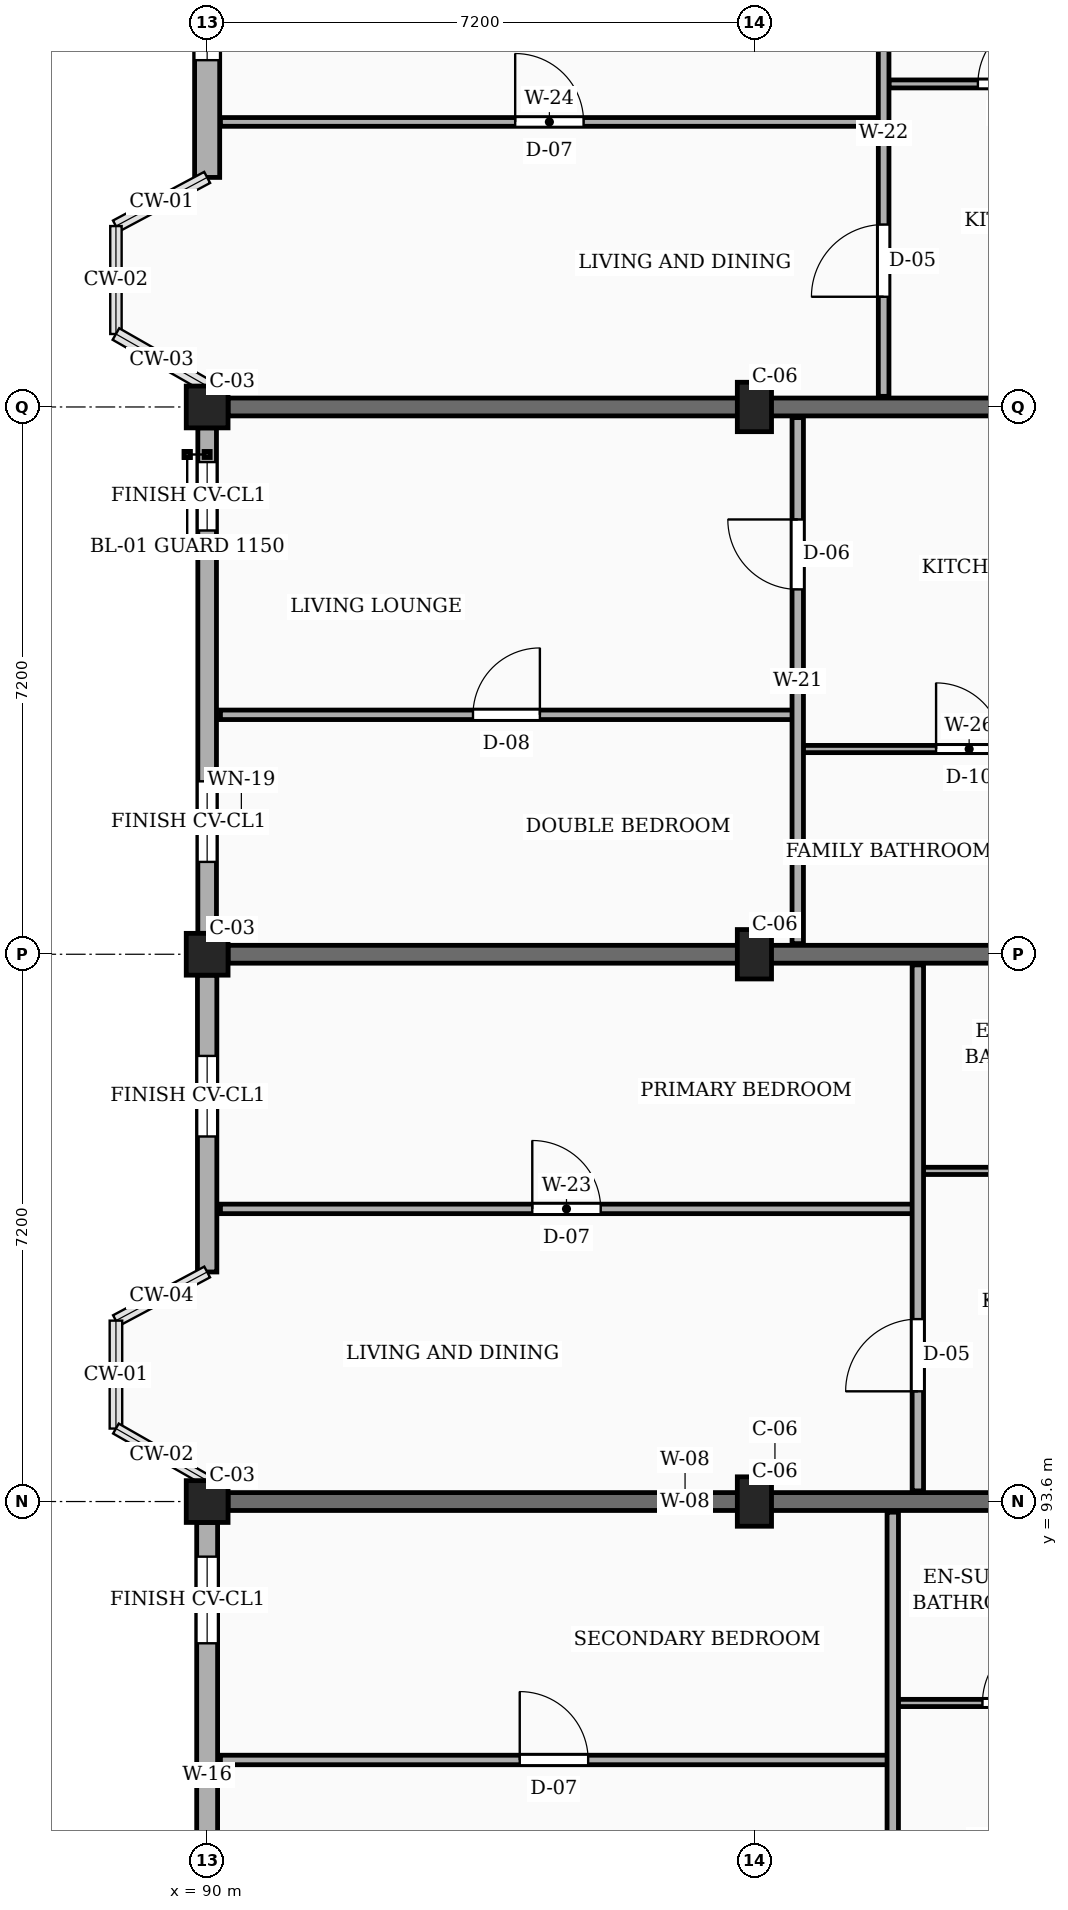
"""IFC4 building model, lengths in metres.
Left out: names, types, materials, properties, quantities, classifications, styles, units other than length and angle.
Written with IfcOpenShell. Run it as: python <this file> out.ifc"""

import sys

from ifc_helpers import new_model, si_unit, direction, frame, frame_2d, origin, origin_2d, place, context, subcontext, project, spatial, rectangle, extrude, element, fill, save


model = new_model("IFC4")
c1 = context("Model", 3, precision=1e-05, world=origin(), true_north=direction((0.0, 1.0)))
c2 = subcontext(c1, "Body", "Model", "MODEL_VIEW")
j1 = project(units=[si_unit("LENGTHUNIT", "METRE"), si_unit("PLANEANGLEUNIT", "RADIAN")], contexts=[c1])
p1 = place(None, origin())
s1 = spatial("IfcSite", under=j1, at=p1, CompositionType="ELEMENT")
p2 = place(p1, origin())
s2 = spatial("IfcBuilding", under=s1, at=p2, CompositionType="ELEMENT")
p3 = place(p2, frame((0.0, 0.0, 13.95)))
s3 = spatial("IfcBuildingStorey", under=s2, at=p3, CompositionType="ELEMENT", Elevation=13.95)
for number, where, z_axis, x_axis in (
    (1, (90.0, 93.6, 0.0), (0.0, 0.0, 1.0), (1.0, 0.0, 0.0)),
    (2, (90.0, 100.8, 0.0), (0.0, 0.0, 1.0), (1.0, 0.0, 0.0)),
    (3, (90.0, 108.0, 0.0), (0.0, 0.0, 1.0), (1.0, 0.0, 0.0)),
):
    element("IfcColumn", number, at=place(p3, frame(where, z_axis=z_axis, x_axis=x_axis)), inside=s3, PredefinedType="COLUMN", context=c2, shape_type="SweptSolid", body=[
        extrude(rectangle(XDim=0.55, YDim=0.55, at=origin_2d()), origin(), (0.0, 0.0, 1.0), 3.15),
    ])
for number, where, z_axis, x_axis in (
    (4, (97.2, 93.6, 0.0), (0.0, 0.0, 1.0), (1.0, 0.0, 0.0)),
    (5, (97.2, 100.8, 0.0), (0.0, 0.0, 1.0), (1.0, 0.0, 0.0)),
    (6, (97.2, 108.0, 0.0), (0.0, 0.0, 1.0), (1.0, 0.0, 0.0)),
):
    element("IfcColumn", number, at=place(p3, frame(where, z_axis=z_axis, x_axis=x_axis)), inside=s3, PredefinedType="COLUMN", context=c2, shape_type="SweptSolid", body=[
        extrude(rectangle(XDim=0.45, YDim=0.65, at=origin_2d()), origin(), (0.0, 0.0, 1.0), 3.15),
    ])
for number, where, z_axis, x_axis in (
    (7, (90.275, 93.6, 0.0), (0.0, 0.0, 1.0), (1.0, 0.0, 0.0)),
    (8, (90.275, 100.8, 0.0), (0.0, 0.0, 1.0), (1.0, 0.0, 0.0)),
    (9, (90.275, 108.0, 0.0), (0.0, 0.0, 1.0), (1.0, 0.0, 0.0)),
):
    element("IfcWall", number, at=place(p3, frame(where, z_axis=z_axis, x_axis=x_axis)), inside=s3, PredefinedType="SOLIDWALL", context=c2, shape_type="SweptSolid", body=[
        extrude(rectangle(XDim=12.025, YDim=0.235, at=frame_2d((6.013, 0.0))), origin(), (0.0, 0.0, 1.0), 2.19),
    ])
p4 = place(p3, frame((90.0, 114.925, 0.0), z_axis=(0.0, 0.0, 1.0), x_axis=(0.0, -1.0, 0.0)))
e10 = element("IfcWall", 10, at=p4, inside=s3, PredefinedType="SOLIDWALL", context=c2, shape_type="SweptSolid", body=[
    extrude(rectangle(XDim=3.905, YDim=0.33, at=frame_2d((1.953, 0.0))), origin(), (0.0, 0.0, 1.0), 2.46),
])
p5 = place(p4, frame((0.923, 0.0, 0.78)))
e11 = element("IfcOpeningElement", 11, at=p5, cuts=e10, PredefinedType="OPENING", context=c2, shape_type="SweptSolid", body=[
    extrude(rectangle(XDim=1.44, YDim=1.26, at=frame_2d((0.72, 0.63))), frame((0.0, 0.175, 0.0), z_axis=(0.0, -1.0, 0.0), x_axis=(1.0, 0.0, 0.0)), (0.0, 0.0, 1.0), 0.35),
])
p6 = place(p3, frame((90.0, 107.725, 0.0), z_axis=(0.0, 0.0, 1.0), x_axis=(0.0, -1.0, 0.0)))
e12 = element("IfcWall", 12, at=p6, inside=s3, PredefinedType="SOLIDWALL", context=c2, shape_type="SweptSolid", body=[
    extrude(rectangle(XDim=6.65, YDim=0.245, at=frame_2d((3.325, 0.0))), origin(), (0.0, 0.0, 1.0), 2.46),
])
p7 = place(p6, frame((0.45, 0.0, 0.78)))
e13 = element("IfcOpeningElement", 13, at=p7, cuts=e12, PredefinedType="OPENING", context=c2, shape_type="SweptSolid", body=[
    extrude(rectangle(XDim=0.9, YDim=1.36, at=frame_2d((0.45, 0.68))), frame((0.0, 0.133, 0.0), z_axis=(0.0, -1.0, 0.0), x_axis=(1.0, 0.0, 0.0)), (0.0, 0.0, 1.0), 0.265),
])
p8 = place(p6, frame((4.65, 0.0, 0.78)))
e14 = element("IfcOpeningElement", 14, at=p8, cuts=e12, PredefinedType="OPENING", context=c2, shape_type="SweptSolid", body=[
    extrude(rectangle(XDim=1.06, YDim=1.36, at=frame_2d((0.53, 0.68))), frame((0.0, 0.133, 0.0), z_axis=(0.0, -1.0, 0.0), x_axis=(1.0, 0.0, 0.0)), (0.0, 0.0, 1.0), 0.265),
])
p9 = place(p3, frame((90.0, 100.525, 0.0), z_axis=(0.0, 0.0, 1.0), x_axis=(0.0, -1.0, 0.0)))
e15 = element("IfcWall", 15, at=p9, inside=s3, PredefinedType="SOLIDWALL", context=c2, shape_type="SweptSolid", body=[
    extrude(rectangle(XDim=3.905, YDim=0.255, at=frame_2d((1.952, 0.0))), origin(), (0.0, 0.0, 1.0), 2.46),
])
p10 = place(p9, frame((1.062, 0.0, 0.78)))
e16 = element("IfcOpeningElement", 16, at=p10, cuts=e15, PredefinedType="OPENING", context=c2, shape_type="SweptSolid", body=[
    extrude(rectangle(XDim=1.06, YDim=1.36, at=frame_2d((0.53, 0.68))), frame((0.0, 0.137, 0.0), z_axis=(0.0, -1.0, 0.0), x_axis=(1.0, 0.0, 0.0)), (0.0, 0.0, 1.0), 0.275),
])
p11 = place(p3, frame((90.0, 93.325, 0.0), z_axis=(0.0, 0.0, 1.0), x_axis=(0.0, -1.0, 0.0)))
e17 = element("IfcWall", 17, at=p11, inside=s3, PredefinedType="SOLIDWALL", context=c2, shape_type="SweptSolid", body=[
    extrude(rectangle(XDim=6.65, YDim=0.275, at=frame_2d((3.325, 0.0))), origin(), (0.0, 0.0, 1.0), 2.46),
])
p12 = place(p11, frame((0.45, 0.0, 0.78)))
e18 = element("IfcOpeningElement", 18, at=p12, cuts=e17, PredefinedType="OPENING", context=c2, shape_type="SweptSolid", body=[
    extrude(rectangle(XDim=1.14, YDim=1.36, at=frame_2d((0.57, 0.68))), frame((0.0, 0.147, 0.0), z_axis=(0.0, -1.0, 0.0), x_axis=(1.0, 0.0, 0.0)), (0.0, 0.0, 1.0), 0.295),
])
p13 = place(p11, frame((4.65, 0.0, 0.78)))
e19 = element("IfcOpeningElement", 19, at=p13, cuts=e17, PredefinedType="OPENING", context=c2, shape_type="SweptSolid", body=[
    extrude(rectangle(XDim=1.3, YDim=1.36, at=frame_2d((0.65, 0.68))), frame((0.0, 0.147, 0.0), z_axis=(0.0, -1.0, 0.0), x_axis=(1.0, 0.0, 0.0)), (0.0, 0.0, 1.0), 0.295),
])
p14 = place(p3, frame((90.175, 90.2, 0.0), z_axis=(0.0, 0.0, 1.0), x_axis=(1.0, 0.0, 0.0)))
e20 = element("IfcWall", 20, at=p14, inside=s3, PredefinedType="PARTITIONING", context=c2, shape_type="SweptSolid", body=[
    extrude(rectangle(XDim=8.775, YDim=0.125, at=frame_2d((4.387, 0.0))), origin(), (0.0, 0.0, 1.0), 2.325),
])
p15 = place(p14, frame((3.938, 0.0, 0.0)))
e21 = element("IfcOpeningElement", 21, at=p15, cuts=e20, PredefinedType="OPENING", context=c2, shape_type="SweptSolid", body=[
    extrude(rectangle(XDim=0.9, YDim=2.1, at=frame_2d((0.45, 1.05))), frame((0.0, 0.073, 0.0), z_axis=(0.0, -1.0, 0.0), x_axis=(1.0, 0.0, 0.0)), (0.0, 0.0, 1.0), 0.145),
])
p16 = place(p3, frame((99.09, 90.95, 0.0), z_axis=(0.0, 0.0, 1.0), x_axis=(1.0, 0.0, 0.0)))
e22 = element("IfcWall", 22, at=p16, inside=s3, PredefinedType="PARTITIONING", context=c2, shape_type="SweptSolid", body=[
    extrude(rectangle(XDim=3.12, YDim=0.095, at=frame_2d((1.56, 0.0))), origin(), (0.0, 0.0, 1.0), 2.325),
])
p17 = place(p16, frame((1.11, 0.0, 0.0)))
e23 = element("IfcOpeningElement", 23, at=p17, cuts=e22, PredefinedType="OPENING", context=c2, shape_type="SweptSolid", body=[
    extrude(rectangle(XDim=0.9, YDim=2.05, at=frame_2d((0.45, 1.025))), frame((0.0, 0.058, 0.0), z_axis=(0.0, -1.0, 0.0), x_axis=(1.0, 0.0, 0.0)), (0.0, 0.0, 1.0), 0.115),
])
p18 = place(p3, frame((99.02, 86.575, 0.0), z_axis=(0.0, 0.0, 1.0), x_axis=(0.0, 1.0, 0.0)))
e24 = element("IfcWall", 24, at=p18, inside=s3, PredefinedType="PARTITIONING", context=c2, shape_type="SweptSolid", body=[
    extrude(rectangle(XDim=6.885, YDim=0.15, at=frame_2d((3.442, 0.0))), origin(), (0.0, 0.0, 1.0), 2.325),
])
p19 = place(p18, frame((1.275, 0.0, 0.0)))
e25 = element("IfcOpeningElement", 25, at=p19, cuts=e24, PredefinedType="OPENING", context=c2, shape_type="SweptSolid", body=[
    extrude(rectangle(XDim=0.95, YDim=2.1, at=frame_2d((0.475, 1.05))), frame((0.0, 0.085, 0.0), z_axis=(0.0, -1.0, 0.0), x_axis=(1.0, 0.0, 0.0)), (0.0, 0.0, 1.0), 0.17),
])
p20 = place(p3, frame((90.175, 97.45, 0.0), z_axis=(0.0, 0.0, 1.0), x_axis=(1.0, 0.0, 0.0)))
e26 = element("IfcWall", 26, at=p20, inside=s3, PredefinedType="PARTITIONING", context=c2, shape_type="SweptSolid", body=[
    extrude(rectangle(XDim=9.105, YDim=0.125, at=frame_2d((4.552, 0.0))), origin(), (0.0, 0.0, 1.0), 2.325),
])
p21 = place(p20, frame((4.103, 0.0, 0.0)))
e27 = element("IfcOpeningElement", 27, at=p21, cuts=e26, PredefinedType="OPENING", context=c2, shape_type="SweptSolid", body=[
    extrude(rectangle(XDim=0.9, YDim=2.1, at=frame_2d((0.45, 1.05))), frame((0.0, 0.073, 0.0), z_axis=(0.0, -1.0, 0.0), x_axis=(1.0, 0.0, 0.0)), (0.0, 0.0, 1.0), 0.145),
])
p22 = place(p3, frame((99.42, 97.95, 0.0), z_axis=(0.0, 0.0, 1.0), x_axis=(1.0, 0.0, 0.0)))
e28 = element("IfcWall", 28, at=p22, inside=s3, PredefinedType="PARTITIONING", context=c2, shape_type="SweptSolid", body=[
    extrude(rectangle(XDim=2.79, YDim=0.095, at=frame_2d((1.395, 0.0))), origin(), (0.0, 0.0, 1.0), 2.325),
])
p23 = place(p22, frame((0.945, 0.0, 0.0)))
e29 = element("IfcOpeningElement", 29, at=p23, cuts=e28, PredefinedType="OPENING", context=c2, shape_type="SweptSolid", body=[
    extrude(rectangle(XDim=0.9, YDim=2.05, at=frame_2d((0.45, 1.025))), frame((0.0, 0.058, 0.0), z_axis=(0.0, -1.0, 0.0), x_axis=(1.0, 0.0, 0.0)), (0.0, 0.0, 1.0), 0.115),
])
p24 = place(p3, frame((99.35, 93.74, 0.0), z_axis=(0.0, 0.0, 1.0), x_axis=(0.0, 1.0, 0.0)))
e30 = element("IfcWall", 30, at=p24, inside=s3, PredefinedType="PARTITIONING", context=c2, shape_type="SweptSolid", body=[
    extrude(rectangle(XDim=6.92, YDim=0.15, at=frame_2d((3.46, 0.0))), origin(), (0.0, 0.0, 1.0), 2.325),
])
p25 = place(p24, frame((1.31, 0.0, 0.0)))
e31 = element("IfcOpeningElement", 31, at=p25, cuts=e30, PredefinedType="OPENING", context=c2, shape_type="SweptSolid", body=[
    extrude(rectangle(XDim=0.95, YDim=2.1, at=frame_2d((0.475, 1.05))), frame((0.0, 0.085, 0.0), z_axis=(0.0, -1.0, 0.0), x_axis=(1.0, 0.0, 0.0)), (0.0, 0.0, 1.0), 0.17),
])
p26 = place(p3, frame((90.175, 103.95, 0.0), z_axis=(0.0, 0.0, 1.0), x_axis=(1.0, 0.0, 0.0)))
e32 = element("IfcWall", 32, at=p26, inside=s3, PredefinedType="PARTITIONING", context=c2, shape_type="SweptSolid", body=[
    extrude(rectangle(XDim=7.525, YDim=0.125, at=frame_2d((3.762, 0.0))), origin(), (0.0, 0.0, 1.0), 2.325),
])
p27 = place(p26, frame((3.323, 0.0, 0.0)))
e33 = element("IfcOpeningElement", 33, at=p27, cuts=e32, PredefinedType="OPENING", context=c2, shape_type="SweptSolid", body=[
    extrude(rectangle(XDim=0.88, YDim=2.08, at=frame_2d((0.44, 1.04))), frame((0.0, 0.073, 0.0), z_axis=(0.0, -1.0, 0.0), x_axis=(1.0, 0.0, 0.0)), (0.0, 0.0, 1.0), 0.145),
])
p28 = place(p3, frame((97.84, 103.5, 0.0), z_axis=(0.0, 0.0, 1.0), x_axis=(1.0, 0.0, 0.0)))
e34 = element("IfcWall", 34, at=p28, inside=s3, PredefinedType="PARTITIONING", context=c2, shape_type="SweptSolid", body=[
    extrude(rectangle(XDim=4.37, YDim=0.095, at=frame_2d((2.185, 0.0))), origin(), (0.0, 0.0, 1.0), 2.325),
])
p29 = place(p28, frame((1.75, 0.0, 0.0)))
e35 = element("IfcOpeningElement", 35, at=p29, cuts=e34, PredefinedType="OPENING", context=c2, shape_type="SweptSolid", body=[
    extrude(rectangle(XDim=0.87, YDim=2.05, at=frame_2d((0.435, 1.025))), frame((0.0, 0.058, 0.0), z_axis=(0.0, -1.0, 0.0), x_axis=(1.0, 0.0, 0.0)), (0.0, 0.0, 1.0), 0.115),
])
p30 = place(p3, frame((97.77, 100.94, 0.0), z_axis=(0.0, 0.0, 1.0), x_axis=(0.0, 1.0, 0.0)))
e36 = element("IfcWall", 36, at=p30, inside=s3, PredefinedType="PARTITIONING", context=c2, shape_type="SweptSolid", body=[
    extrude(rectangle(XDim=6.92, YDim=0.15, at=frame_2d((3.46, 0.0))), origin(), (0.0, 0.0, 1.0), 2.325),
])
p31 = place(p30, frame((4.66, 0.0, 0.0)))
e37 = element("IfcOpeningElement", 37, at=p31, cuts=e36, PredefinedType="OPENING", context=c2, shape_type="SweptSolid", body=[
    extrude(rectangle(XDim=0.92, YDim=2.1, at=frame_2d((0.46, 1.05))), frame((0.0, 0.085, 0.0), z_axis=(0.0, -1.0, 0.0), x_axis=(1.0, 0.0, 0.0)), (0.0, 0.0, 1.0), 0.17),
])
p32 = place(p3, frame((90.175, 111.75, 0.0), z_axis=(0.0, 0.0, 1.0), x_axis=(1.0, 0.0, 0.0)))
e38 = element("IfcWall", 38, at=p32, inside=s3, PredefinedType="PARTITIONING", context=c2, shape_type="SweptSolid", body=[
    extrude(rectangle(XDim=8.655, YDim=0.115, at=frame_2d((4.328, 0.0))), origin(), (0.0, 0.0, 1.0), 2.325),
])
p33 = place(p32, frame((3.877, 0.0, 0.0)))
e39 = element("IfcOpeningElement", 39, at=p33, cuts=e38, PredefinedType="OPENING", context=c2, shape_type="SweptSolid", body=[
    extrude(rectangle(XDim=0.9, YDim=2.1, at=frame_2d((0.45, 1.05))), frame((0.0, 0.067, 0.0), z_axis=(0.0, -1.0, 0.0), x_axis=(1.0, 0.0, 0.0)), (0.0, 0.0, 1.0), 0.135),
])
p34 = place(p3, frame((98.97, 112.25, 0.0), z_axis=(0.0, 0.0, 1.0), x_axis=(1.0, 0.0, 0.0)))
e40 = element("IfcWall", 40, at=p34, inside=s3, PredefinedType="PARTITIONING", context=c2, shape_type="SweptSolid", body=[
    extrude(rectangle(XDim=3.24, YDim=0.105, at=frame_2d((1.62, 0.0))), origin(), (0.0, 0.0, 1.0), 2.325),
])
p35 = place(p34, frame((1.17, 0.0, 0.0)))
e41 = element("IfcOpeningElement", 41, at=p35, cuts=e40, PredefinedType="OPENING", context=c2, shape_type="SweptSolid", body=[
    extrude(rectangle(XDim=0.9, YDim=2.05, at=frame_2d((0.45, 1.025))), frame((0.0, 0.062, 0.0), z_axis=(0.0, -1.0, 0.0), x_axis=(1.0, 0.0, 0.0)), (0.0, 0.0, 1.0), 0.125),
])
p36 = place(p3, frame((98.9, 108.14, 0.0), z_axis=(0.0, 0.0, 1.0), x_axis=(0.0, 1.0, 0.0)))
e42 = element("IfcWall", 42, at=p36, inside=s3, PredefinedType="PARTITIONING", context=c2, shape_type="SweptSolid", body=[
    extrude(rectangle(XDim=6.92, YDim=0.14, at=frame_2d((3.46, 0.0))), origin(), (0.0, 0.0, 1.0), 2.325),
])
p37 = place(p36, frame((1.31, 0.0, 0.0)))
e43 = element("IfcOpeningElement", 43, at=p37, cuts=e42, PredefinedType="OPENING", context=c2, shape_type="SweptSolid", body=[
    extrude(rectangle(XDim=0.95, YDim=2.1, at=frame_2d((0.475, 1.05))), frame((0.0, 0.08, 0.0), z_axis=(0.0, -1.0, 0.0), x_axis=(1.0, 0.0, 0.0)), (0.0, 0.0, 1.0), 0.16),
])
p38 = place(p5, origin())
e44 = element("IfcWindow", 44, at=p38, inside=s3, PartitioningType="SINGLE_PANEL", PredefinedType="WINDOW", context=c2, shape_type="SweptSolid", body=[
    extrude(rectangle(XDim=1.44, YDim=1.26, at=frame_2d((0.72, 0.63))), frame((0.0, 0.03, 0.0), z_axis=(0.0, -1.0, 0.0), x_axis=(1.0, 0.0, 0.0)), (0.0, 0.0, 1.0), 0.06),
])
fill(e11, e44)
p39 = place(p7, origin())
e45 = element("IfcWindow", 45, at=p39, inside=s3, PartitioningType="SINGLE_PANEL", PredefinedType="WINDOW", context=c2, shape_type="SweptSolid", body=[
    extrude(rectangle(XDim=0.9, YDim=1.36, at=frame_2d((0.45, 0.68))), frame((0.0, 0.03, 0.0), z_axis=(0.0, -1.0, 0.0), x_axis=(1.0, 0.0, 0.0)), (0.0, 0.0, 1.0), 0.06),
])
fill(e13, e45)
p40 = place(p8, origin())
e46 = element("IfcWindow", 46, at=p40, inside=s3, PartitioningType="SINGLE_PANEL", PredefinedType="WINDOW", context=c2, shape_type="SweptSolid", body=[
    extrude(rectangle(XDim=1.06, YDim=1.36, at=frame_2d((0.53, 0.68))), frame((0.0, 0.03, 0.0), z_axis=(0.0, -1.0, 0.0), x_axis=(1.0, 0.0, 0.0)), (0.0, 0.0, 1.0), 0.06),
])
fill(e14, e46)
p41 = place(p10, origin())
e47 = element("IfcWindow", 47, at=p41, inside=s3, PartitioningType="SINGLE_PANEL", PredefinedType="WINDOW", context=c2, shape_type="SweptSolid", body=[
    extrude(rectangle(XDim=1.06, YDim=1.36, at=frame_2d((0.53, 0.68))), frame((0.0, 0.03, 0.0), z_axis=(0.0, -1.0, 0.0), x_axis=(1.0, 0.0, 0.0)), (0.0, 0.0, 1.0), 0.06),
])
fill(e16, e47)
p42 = place(p12, origin())
e48 = element("IfcWindow", 48, at=p42, inside=s3, PartitioningType="SINGLE_PANEL", PredefinedType="WINDOW", context=c2, shape_type="SweptSolid", body=[
    extrude(rectangle(XDim=1.14, YDim=1.36, at=frame_2d((0.57, 0.68))), frame((0.0, 0.03, 0.0), z_axis=(0.0, -1.0, 0.0), x_axis=(1.0, 0.0, 0.0)), (0.0, 0.0, 1.0), 0.06),
])
fill(e18, e48)
p43 = place(p15, origin())
e49 = element("IfcDoor", 49, at=p43, inside=s3, OperationType="SINGLE_SWING_LEFT", PredefinedType="DOOR", context=c2, shape_type="SweptSolid", body=[
    extrude(rectangle(XDim=0.9, YDim=2.1, at=frame_2d((0.45, 1.05))), frame((0.0, 0.025, 0.0), z_axis=(0.0, -1.0, 0.0), x_axis=(1.0, 0.0, 0.0)), (0.0, 0.0, 1.0), 0.05),
])
fill(e21, e49)
p44 = place(p17, origin())
e50 = element("IfcDoor", 50, at=p44, inside=s3, OperationType="SINGLE_SWING_RIGHT", PredefinedType="DOOR", context=c2, shape_type="SweptSolid", body=[
    extrude(rectangle(XDim=0.9, YDim=2.05, at=frame_2d((0.45, 1.025))), frame((0.0, 0.025, 0.0), z_axis=(0.0, -1.0, 0.0), x_axis=(1.0, 0.0, 0.0)), (0.0, 0.0, 1.0), 0.05),
])
fill(e23, e50)
p45 = place(p21, origin())
e51 = element("IfcDoor", 51, at=p45, inside=s3, OperationType="SINGLE_SWING_LEFT", PredefinedType="DOOR", context=c2, shape_type="SweptSolid", body=[
    extrude(rectangle(XDim=0.9, YDim=2.1, at=frame_2d((0.45, 1.05))), frame((0.0, 0.025, 0.0), z_axis=(0.0, -1.0, 0.0), x_axis=(1.0, 0.0, 0.0)), (0.0, 0.0, 1.0), 0.05),
])
fill(e27, e51)
p46 = place(p25, origin())
e52 = element("IfcDoor", 52, at=p46, inside=s3, OperationType="SINGLE_SWING_LEFT", PredefinedType="DOOR", context=c2, shape_type="SweptSolid", body=[
    extrude(rectangle(XDim=0.95, YDim=2.1, at=frame_2d((0.475, 1.05))), frame((0.0, 0.025, 0.0), z_axis=(0.0, -1.0, 0.0), x_axis=(1.0, 0.0, 0.0)), (0.0, 0.0, 1.0), 0.05),
])
fill(e31, e52)
p47 = place(p27, origin())
e53 = element("IfcDoor", 53, at=p47, inside=s3, OperationType="SINGLE_SWING_RIGHT", PredefinedType="DOOR", context=c2, shape_type="SweptSolid", body=[
    extrude(rectangle(XDim=0.88, YDim=2.08, at=frame_2d((0.44, 1.04))), frame((0.0, 0.025, 0.0), z_axis=(0.0, -1.0, 0.0), x_axis=(1.0, 0.0, 0.0)), (0.0, 0.0, 1.0), 0.05),
])
fill(e33, e53)
p48 = place(p29, origin())
e54 = element("IfcDoor", 54, at=p48, inside=s3, OperationType="SINGLE_SWING_LEFT", PredefinedType="DOOR", context=c2, shape_type="SweptSolid", body=[
    extrude(rectangle(XDim=0.87, YDim=2.05, at=frame_2d((0.435, 1.025))), frame((0.0, 0.025, 0.0), z_axis=(0.0, -1.0, 0.0), x_axis=(1.0, 0.0, 0.0)), (0.0, 0.0, 1.0), 0.05),
])
fill(e35, e54)
p49 = place(p31, origin())
e55 = element("IfcDoor", 55, at=p49, inside=s3, OperationType="SINGLE_SWING_RIGHT", PredefinedType="DOOR", context=c2, shape_type="SweptSolid", body=[
    extrude(rectangle(XDim=0.92, YDim=2.1, at=frame_2d((0.46, 1.05))), frame((0.0, 0.025, 0.0), z_axis=(0.0, -1.0, 0.0), x_axis=(1.0, 0.0, 0.0)), (0.0, 0.0, 1.0), 0.05),
])
fill(e37, e55)
p50 = place(p33, origin())
e56 = element("IfcDoor", 56, at=p50, inside=s3, OperationType="SINGLE_SWING_LEFT", PredefinedType="DOOR", context=c2, shape_type="SweptSolid", body=[
    extrude(rectangle(XDim=0.9, YDim=2.1, at=frame_2d((0.45, 1.05))), frame((0.0, 0.025, 0.0), z_axis=(0.0, -1.0, 0.0), x_axis=(1.0, 0.0, 0.0)), (0.0, 0.0, 1.0), 0.05),
])
fill(e39, e56)
p51 = place(p35, origin())
e57 = element("IfcDoor", 57, at=p51, inside=s3, OperationType="SINGLE_SWING_RIGHT", PredefinedType="DOOR", context=c2, shape_type="SweptSolid", body=[
    extrude(rectangle(XDim=0.9, YDim=2.05, at=frame_2d((0.45, 1.025))), frame((0.0, 0.025, 0.0), z_axis=(0.0, -1.0, 0.0), x_axis=(1.0, 0.0, 0.0)), (0.0, 0.0, 1.0), 0.05),
])
fill(e41, e57)
p52 = place(p37, origin())
e58 = element("IfcDoor", 58, at=p52, inside=s3, OperationType="SINGLE_SWING_LEFT", PredefinedType="DOOR", context=c2, shape_type="SweptSolid", body=[
    extrude(rectangle(XDim=0.95, YDim=2.1, at=frame_2d((0.475, 1.05))), frame((0.0, 0.025, 0.0), z_axis=(0.0, -1.0, 0.0), x_axis=(1.0, 0.0, 0.0)), (0.0, 0.0, 1.0), 0.05),
])
fill(e43, e58)
save(model, sys.argv[1])
